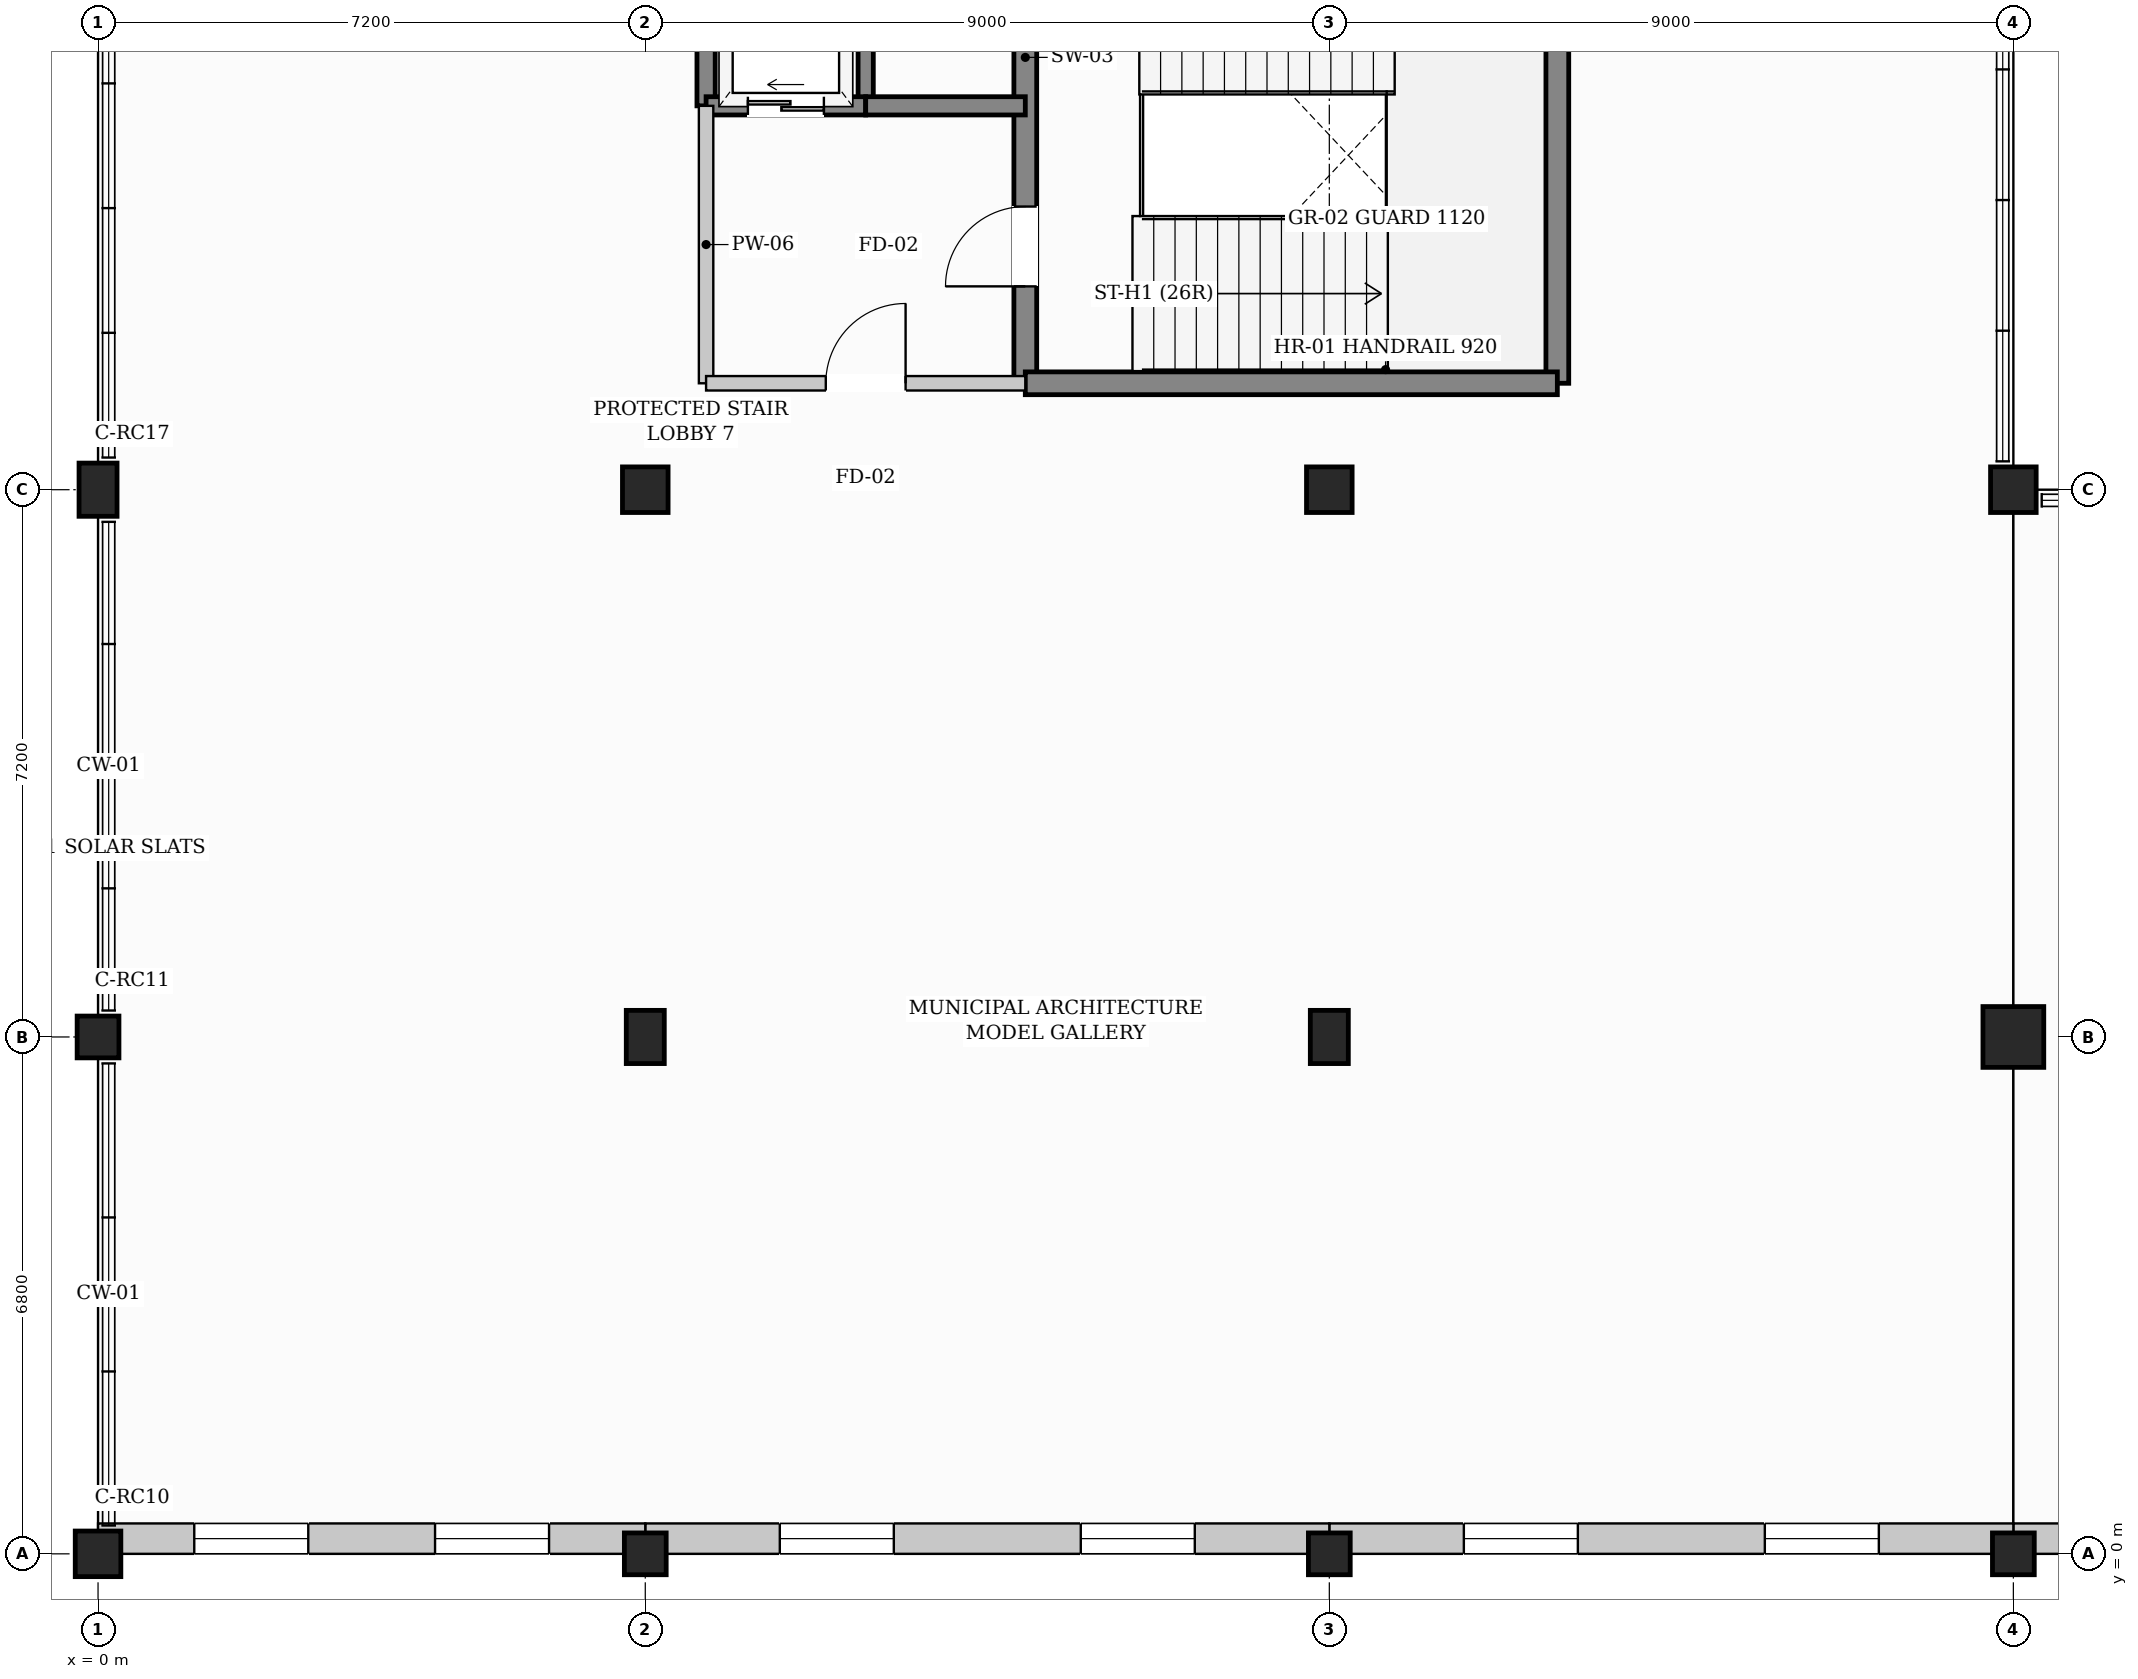
"""IFC4 building model, lengths in metres.
Left out: names, types, materials, properties, quantities, classifications, styles, units other than length and angle.
Written with IfcOpenShell. Run it as: python <this file> out.ifc"""

import sys

from ifc_helpers import new_model, si_unit, direction, frame, frame_2d, origin, origin_with_axes, origin_2d, place, context, subcontext, project, spatial, rectangle, extrude, element, fill, save


model = new_model("IFC4")
c1 = context("Model", 3, precision=1e-05, world=origin(), true_north=direction((0.0, 1.0)))
c2 = subcontext(c1, "Body", "Model", "MODEL_VIEW")
j1 = project(units=[si_unit("LENGTHUNIT", "METRE"), si_unit("PLANEANGLEUNIT", "RADIAN")], contexts=[c1])
p1 = place(None, origin())
s1 = spatial("IfcSite", under=j1, at=p1, CompositionType="ELEMENT")
p2 = place(p1, origin())
s2 = spatial("IfcBuilding", under=s1, at=p2, CompositionType="ELEMENT")
p3 = place(p2, frame((0.0, 0.0, 9.6)))
s3 = spatial("IfcBuildingStorey", under=s2, at=p3, CompositionType="ELEMENT", Elevation=9.6)
p4 = place(p3, origin_with_axes())
e1 = element("IfcColumn", 1, at=p4, inside=s3, PredefinedType="COLUMN", context=c2, shape_type="SweptSolid", body=[
    extrude(rectangle(XDim=0.6, YDim=0.6, at=origin_2d()), origin(), (0.0, 0.0, 1.0), 3.6),
])
p5 = place(p3, frame((0.0, 6.8, 0.0), z_axis=(0.0, 0.0, 1.0), x_axis=(1.0, 0.0, 0.0)))
e2 = element("IfcColumn", 2, at=p5, inside=s3, PredefinedType="COLUMN", context=c2, shape_type="SweptSolid", body=[
    extrude(rectangle(XDim=0.55, YDim=0.55, at=origin_2d()), origin(), (0.0, 0.0, 1.0), 3.6),
])
p6 = place(p3, frame((0.0, 14.0, 0.0), z_axis=(0.0, 0.0, 1.0), x_axis=(1.0, 0.0, 0.0)))
e3 = element("IfcColumn", 3, at=p6, inside=s3, PredefinedType="COLUMN", context=c2, shape_type="SweptSolid", body=[
    extrude(rectangle(XDim=0.5, YDim=0.7, at=origin_2d()), origin(), (0.0, 0.0, 1.0), 3.6),
])
p7 = place(p3, frame((7.2, 0.0, 0.0), z_axis=(0.0, 0.0, 1.0), x_axis=(1.0, 0.0, 0.0)))
e4 = element("IfcColumn", 4, at=p7, inside=s3, PredefinedType="COLUMN", context=c2, shape_type="SweptSolid", body=[
    extrude(rectangle(XDim=0.55, YDim=0.55, at=origin_2d()), origin(), (0.0, 0.0, 1.0), 3.6),
])
p8 = place(p3, frame((7.2, 6.8, 0.0), z_axis=(0.0, 0.0, 1.0), x_axis=(1.0, 0.0, 0.0)))
e5 = element("IfcColumn", 5, at=p8, inside=s3, PredefinedType="COLUMN", context=c2, shape_type="SweptSolid", body=[
    extrude(rectangle(XDim=0.5, YDim=0.7, at=origin_2d()), origin(), (0.0, 0.0, 1.0), 3.6),
])
p9 = place(p3, frame((7.2, 14.0, 0.0), z_axis=(0.0, 0.0, 1.0), x_axis=(1.0, 0.0, 0.0)))
e6 = element("IfcColumn", 6, at=p9, inside=s3, PredefinedType="COLUMN", context=c2, shape_type="SweptSolid", body=[
    extrude(rectangle(XDim=0.6, YDim=0.6, at=origin_2d()), origin(), (0.0, 0.0, 1.0), 3.6),
])
p10 = place(p3, frame((16.2, 0.0, 0.0), z_axis=(0.0, 0.0, 1.0), x_axis=(1.0, 0.0, 0.0)))
e7 = element("IfcColumn", 7, at=p10, inside=s3, PredefinedType="COLUMN", context=c2, shape_type="SweptSolid", body=[
    extrude(rectangle(XDim=0.55, YDim=0.55, at=origin_2d()), origin(), (0.0, 0.0, 1.0), 3.6),
])
p11 = place(p3, frame((16.2, 6.8, 0.0), z_axis=(0.0, 0.0, 1.0), x_axis=(1.0, 0.0, 0.0)))
e8 = element("IfcColumn", 8, at=p11, inside=s3, PredefinedType="COLUMN", context=c2, shape_type="SweptSolid", body=[
    extrude(rectangle(XDim=0.5, YDim=0.7, at=origin_2d()), origin(), (0.0, 0.0, 1.0), 3.6),
])
p12 = place(p3, frame((16.2, 14.0, 0.0), z_axis=(0.0, 0.0, 1.0), x_axis=(1.0, 0.0, 0.0)))
e9 = element("IfcColumn", 9, at=p12, inside=s3, PredefinedType="COLUMN", context=c2, shape_type="SweptSolid", body=[
    extrude(rectangle(XDim=0.6, YDim=0.6, at=origin_2d()), origin(), (0.0, 0.0, 1.0), 3.6),
])
p13 = place(p3, frame((25.2, 0.0, 0.0), z_axis=(0.0, 0.0, 1.0), x_axis=(1.0, 0.0, 0.0)))
e10 = element("IfcColumn", 10, at=p13, inside=s3, PredefinedType="COLUMN", context=c2, shape_type="SweptSolid", body=[
    extrude(rectangle(XDim=0.55, YDim=0.55, at=origin_2d()), origin(), (0.0, 0.0, 1.0), 3.6),
])
p14 = place(p3, frame((25.2, 6.8, 0.0), z_axis=(0.0, 0.0, 1.0), x_axis=(1.0, 0.0, 0.0)))
e11 = element("IfcColumn", 11, at=p14, inside=s3, PredefinedType="COLUMN", context=c2, shape_type="SweptSolid", body=[
    extrude(rectangle(XDim=0.8, YDim=0.8, at=origin_2d()), origin(), (0.0, 0.0, 1.0), 3.6),
])
p15 = place(p3, frame((25.2, 14.0, 0.0), z_axis=(0.0, 0.0, 1.0), x_axis=(1.0, 0.0, 0.0)))
e12 = element("IfcColumn", 12, at=p15, inside=s3, PredefinedType="COLUMN", context=c2, shape_type="SweptSolid", body=[
    extrude(rectangle(XDim=0.6, YDim=0.6, at=origin_2d()), origin(), (0.0, 0.0, 1.0), 3.6),
])
p16 = place(p3, frame((32.4, 0.2, 0.0), z_axis=(0.0, 0.0, 1.0), x_axis=(-1.0, 0.0, 0.0)))
e13 = element("IfcWall", 13, at=p16, inside=s3, PredefinedType="SOLIDWALL", context=c2, shape_type="SweptSolid", body=[
    extrude(rectangle(XDim=7.2, YDim=0.4, at=frame_2d((3.6, 0.0))), origin(), (0.0, 0.0, 1.0), 2.6),
])
p17 = place(p16, frame((1.266, 0.0, 0.75)))
e14 = element("IfcOpeningElement", 14, at=p17, cuts=e13, PredefinedType="OPENING", context=c2, shape_type="SweptSolid", body=[
    extrude(rectangle(XDim=1.5, YDim=1.6, at=frame_2d((0.75, 0.8))), frame((0.0, 0.21, 0.0), z_axis=(0.0, -1.0, 0.0), x_axis=(1.0, 0.0, 0.0)), (0.0, 0.0, 1.0), 0.42),
])
p18 = place(p16, frame((4.434, 0.0, 0.75)))
e15 = element("IfcOpeningElement", 15, at=p18, cuts=e13, PredefinedType="OPENING", context=c2, shape_type="SweptSolid", body=[
    extrude(rectangle(XDim=1.5, YDim=1.6, at=frame_2d((0.75, 0.8))), frame((0.0, 0.21, 0.0), z_axis=(0.0, -1.0, 0.0), x_axis=(1.0, 0.0, 0.0)), (0.0, 0.0, 1.0), 0.42),
])
p19 = place(p3, frame((25.2, 0.2, 0.0), z_axis=(0.0, 0.0, 1.0), x_axis=(-1.0, 0.0, 0.0)))
e16 = element("IfcWall", 16, at=p19, inside=s3, PredefinedType="SOLIDWALL", context=c2, shape_type="SweptSolid", body=[
    extrude(rectangle(XDim=9.0, YDim=0.4, at=frame_2d((4.5, 0.0))), origin(), (0.0, 0.0, 1.0), 2.64),
])
p20 = place(p19, frame((1.77, 0.0, 0.75)))
e17 = element("IfcOpeningElement", 17, at=p20, cuts=e16, PredefinedType="OPENING", context=c2, shape_type="SweptSolid", body=[
    extrude(rectangle(XDim=1.5, YDim=1.6, at=frame_2d((0.75, 0.8))), frame((0.0, 0.21, 0.0), z_axis=(0.0, -1.0, 0.0), x_axis=(1.0, 0.0, 0.0)), (0.0, 0.0, 1.0), 0.42),
])
p21 = place(p19, frame((5.73, 0.0, 0.75)))
e18 = element("IfcOpeningElement", 18, at=p21, cuts=e16, PredefinedType="OPENING", context=c2, shape_type="SweptSolid", body=[
    extrude(rectangle(XDim=1.5, YDim=1.6, at=frame_2d((0.75, 0.8))), frame((0.0, 0.21, 0.0), z_axis=(0.0, -1.0, 0.0), x_axis=(1.0, 0.0, 0.0)), (0.0, 0.0, 1.0), 0.42),
])
p22 = place(p3, frame((16.2, 0.2, 0.0), z_axis=(0.0, 0.0, 1.0), x_axis=(-1.0, 0.0, 0.0)))
e19 = element("IfcWall", 19, at=p22, inside=s3, PredefinedType="SOLIDWALL", context=c2, shape_type="SweptSolid", body=[
    extrude(rectangle(XDim=9.0, YDim=0.4, at=frame_2d((4.5, 0.0))), origin(), (0.0, 0.0, 1.0), 2.6),
])
p23 = place(p22, frame((1.77, 0.0, 0.75)))
e20 = element("IfcOpeningElement", 20, at=p23, cuts=e19, PredefinedType="OPENING", context=c2, shape_type="SweptSolid", body=[
    extrude(rectangle(XDim=1.5, YDim=1.6, at=frame_2d((0.75, 0.8))), frame((0.0, 0.21, 0.0), z_axis=(0.0, -1.0, 0.0), x_axis=(1.0, 0.0, 0.0)), (0.0, 0.0, 1.0), 0.42),
])
p24 = place(p22, frame((5.73, 0.0, 0.75)))
e21 = element("IfcOpeningElement", 21, at=p24, cuts=e19, PredefinedType="OPENING", context=c2, shape_type="SweptSolid", body=[
    extrude(rectangle(XDim=1.5, YDim=1.6, at=frame_2d((0.75, 0.8))), frame((0.0, 0.21, 0.0), z_axis=(0.0, -1.0, 0.0), x_axis=(1.0, 0.0, 0.0)), (0.0, 0.0, 1.0), 0.42),
])
p25 = place(p3, frame((7.2, 0.2, 0.0), z_axis=(0.0, 0.0, 1.0), x_axis=(-1.0, 0.0, 0.0)))
e22 = element("IfcWall", 22, at=p25, inside=s3, PredefinedType="SOLIDWALL", context=c2, shape_type="SweptSolid", body=[
    extrude(rectangle(XDim=7.2, YDim=0.4, at=frame_2d((3.6, 0.0))), origin(), (0.0, 0.0, 1.0), 2.6),
])
p26 = place(p25, frame((1.266, 0.0, 0.75)))
e23 = element("IfcOpeningElement", 23, at=p26, cuts=e22, PredefinedType="OPENING", context=c2, shape_type="SweptSolid", body=[
    extrude(rectangle(XDim=1.5, YDim=1.6, at=frame_2d((0.75, 0.8))), frame((0.0, 0.21, 0.0), z_axis=(0.0, -1.0, 0.0), x_axis=(1.0, 0.0, 0.0)), (0.0, 0.0, 1.0), 0.42),
])
p27 = place(p25, frame((4.434, 0.0, 0.75)))
e24 = element("IfcOpeningElement", 24, at=p27, cuts=e22, PredefinedType="OPENING", context=c2, shape_type="SweptSolid", body=[
    extrude(rectangle(XDim=1.5, YDim=1.6, at=frame_2d((0.75, 0.8))), frame((0.0, 0.21, 0.0), z_axis=(0.0, -1.0, 0.0), x_axis=(1.0, 0.0, 0.0)), (0.0, 0.0, 1.0), 0.42),
])
p28 = place(p3, frame((12.2, 15.4, 0.0), z_axis=(0.0, 0.0, 1.0), x_axis=(0.0, 1.0, 0.0)))
e25 = element("IfcWall", 25, at=p28, inside=s3, PredefinedType="SHEAR", context=c2, shape_type="SweptSolid", body=[
    extrude(rectangle(XDim=6.0, YDim=0.3, at=frame_2d((3.0, 0.0))), origin(), (0.0, 0.0, 1.0), 3.32),
])
p29 = place(p28, frame((1.275, 0.0, 0.0)))
e26 = element("IfcOpeningElement", 26, at=p29, cuts=e25, PredefinedType="OPENING", context=c2, shape_type="SweptSolid", body=[
    extrude(rectangle(XDim=1.05, YDim=2.15, at=frame_2d((0.525, 1.075))), frame((0.0, 0.16, 0.0), z_axis=(0.0, -1.0, 0.0), x_axis=(1.0, 0.0, 0.0)), (0.0, 0.0, 1.0), 0.32),
])
p30 = place(p3, frame((19.2, 15.4, 0.0), z_axis=(0.0, 0.0, 1.0), x_axis=(0.0, 1.0, 0.0)))
e27 = element("IfcWall", 27, at=p30, inside=s3, PredefinedType="SHEAR", context=c2, shape_type="SweptSolid", body=[
    extrude(rectangle(XDim=6.0, YDim=0.3, at=frame_2d((3.0, 0.0))), origin(), (0.0, 0.0, 1.0), 3.32),
])
p31 = place(p3, frame((12.2, 15.4, 0.0), z_axis=(0.0, 0.0, 1.0), x_axis=(1.0, 0.0, 0.0)))
e28 = element("IfcWall", 28, at=p31, inside=s3, PredefinedType="SHEAR", context=c2, shape_type="SweptSolid", body=[
    extrude(rectangle(XDim=7.0, YDim=0.3, at=frame_2d((3.5, 0.0))), origin(), (0.0, 0.0, 1.0), 3.32),
])
p32 = place(p3, frame((8.0, 19.05, 0.0), z_axis=(0.0, 0.0, 1.0), x_axis=(0.0, 1.0, 0.0)))
e29 = element("IfcWall", 29, at=p32, inside=s3, PredefinedType="SHEAR", context=c2, shape_type="SweptSolid", body=[
    extrude(rectangle(XDim=2.35, YDim=0.24, at=frame_2d((1.175, 0.0))), origin(), (0.0, 0.0, 1.0), 3.32),
])
p33 = place(p3, frame((10.1, 19.05, 0.0), z_axis=(0.0, 0.0, 1.0), x_axis=(0.0, 1.0, 0.0)))
e30 = element("IfcWall", 30, at=p33, inside=s3, PredefinedType="SHEAR", context=c2, shape_type="SweptSolid", body=[
    extrude(rectangle(XDim=2.35, YDim=0.2, at=frame_2d((1.175, 0.0))), origin(), (0.0, 0.0, 1.0), 3.32),
])
p34 = place(p3, frame((8.0, 19.05, 0.0), z_axis=(0.0, 0.0, 1.0), x_axis=(1.0, 0.0, 0.0)))
e31 = element("IfcWall", 31, at=p34, inside=s3, PredefinedType="SHEAR", context=c2, shape_type="SweptSolid", body=[
    extrude(rectangle(XDim=2.1, YDim=0.24, at=frame_2d((1.05, 0.0))), origin(), (0.0, 0.0, 1.0), 3.32),
])
p35 = place(p34, frame((0.55, 0.0, 0.0)))
e32 = element("IfcOpeningElement", 32, at=p35, cuts=e31, PredefinedType="OPENING", context=c2, shape_type="SweptSolid", body=[
    extrude(rectangle(XDim=1.0, YDim=2.1, at=frame_2d((0.5, 1.05))), frame((0.0, 0.13, 0.0), z_axis=(0.0, -1.0, 0.0), x_axis=(1.0, 0.0, 0.0)), (0.0, 0.0, 1.0), 0.26),
])
p36 = place(p3, frame((10.1, 19.05, 0.0), z_axis=(0.0, 0.0, 1.0), x_axis=(1.0, 0.0, 0.0)))
e33 = element("IfcWall", 33, at=p36, inside=s3, PredefinedType="SHEAR", context=c2, shape_type="SweptSolid", body=[
    extrude(rectangle(XDim=2.1, YDim=0.24, at=frame_2d((1.05, 0.0))), origin(), (0.0, 0.0, 1.0), 3.32),
])
p37 = place(p3, frame((8.0, 15.4, 0.0), z_axis=(0.0, 0.0, 1.0), x_axis=(0.0, 1.0, 0.0)))
e34 = element("IfcWall", 34, at=p37, inside=s3, PredefinedType="PARTITIONING", context=c2, shape_type="SweptSolid", body=[
    extrude(rectangle(XDim=3.65, YDim=0.19, at=frame_2d((1.825, 0.0))), origin(), (0.0, 0.0, 1.0), 3.32),
])
p38 = place(p3, frame((8.0, 15.4, 0.0), z_axis=(0.0, 0.0, 1.0), x_axis=(1.0, 0.0, 0.0)))
e35 = element("IfcWall", 35, at=p38, inside=s3, PredefinedType="PARTITIONING", context=c2, shape_type="SweptSolid", body=[
    extrude(rectangle(XDim=4.2, YDim=0.19, at=frame_2d((2.1, 0.0))), origin(), (0.0, 0.0, 1.0), 3.32),
])
p39 = place(p38, frame((1.575, 0.0, 0.0)))
e36 = element("IfcOpeningElement", 36, at=p39, cuts=e35, PredefinedType="OPENING", context=c2, shape_type="SweptSolid", body=[
    extrude(rectangle(XDim=1.05, YDim=2.15, at=frame_2d((0.525, 1.075))), frame((0.0, 0.105, 0.0), z_axis=(0.0, -1.0, 0.0), x_axis=(1.0, 0.0, 0.0)), (0.0, 0.0, 1.0), 0.21),
])
p40 = place(p20, origin())
e37 = element("IfcWindow", 37, at=p40, inside=s3, PartitioningType="DOUBLE_PANEL_HORIZONTAL", PredefinedType="WINDOW", context=c2, shape_type="SweptSolid", body=[
    extrude(rectangle(XDim=1.5, YDim=1.6, at=frame_2d((0.75, 0.8))), frame((0.0, 0.03, 0.0), z_axis=(0.0, -1.0, 0.0), x_axis=(1.0, 0.0, 0.0)), (0.0, 0.0, 1.0), 0.06),
])
fill(e17, e37)
p41 = place(p21, origin())
e38 = element("IfcWindow", 38, at=p41, inside=s3, PartitioningType="DOUBLE_PANEL_HORIZONTAL", PredefinedType="WINDOW", context=c2, shape_type="SweptSolid", body=[
    extrude(rectangle(XDim=1.5, YDim=1.6, at=frame_2d((0.75, 0.8))), frame((0.0, 0.03, 0.0), z_axis=(0.0, -1.0, 0.0), x_axis=(1.0, 0.0, 0.0)), (0.0, 0.0, 1.0), 0.06),
])
fill(e18, e38)
p42 = place(p23, origin())
e39 = element("IfcWindow", 39, at=p42, inside=s3, PartitioningType="DOUBLE_PANEL_HORIZONTAL", PredefinedType="WINDOW", context=c2, shape_type="SweptSolid", body=[
    extrude(rectangle(XDim=1.5, YDim=1.6, at=frame_2d((0.75, 0.8))), frame((0.0, 0.03, 0.0), z_axis=(0.0, -1.0, 0.0), x_axis=(1.0, 0.0, 0.0)), (0.0, 0.0, 1.0), 0.06),
])
fill(e20, e39)
p43 = place(p24, origin())
e40 = element("IfcWindow", 40, at=p43, inside=s3, PartitioningType="DOUBLE_PANEL_HORIZONTAL", PredefinedType="WINDOW", context=c2, shape_type="SweptSolid", body=[
    extrude(rectangle(XDim=1.5, YDim=1.6, at=frame_2d((0.75, 0.8))), frame((0.0, 0.03, 0.0), z_axis=(0.0, -1.0, 0.0), x_axis=(1.0, 0.0, 0.0)), (0.0, 0.0, 1.0), 0.06),
])
fill(e21, e40)
p44 = place(p26, origin())
e41 = element("IfcWindow", 41, at=p44, inside=s3, PartitioningType="DOUBLE_PANEL_HORIZONTAL", PredefinedType="WINDOW", context=c2, shape_type="SweptSolid", body=[
    extrude(rectangle(XDim=1.5, YDim=1.6, at=frame_2d((0.75, 0.8))), frame((0.0, 0.03, 0.0), z_axis=(0.0, -1.0, 0.0), x_axis=(1.0, 0.0, 0.0)), (0.0, 0.0, 1.0), 0.06),
])
fill(e23, e41)
p45 = place(p27, origin())
e42 = element("IfcWindow", 42, at=p45, inside=s3, PartitioningType="DOUBLE_PANEL_HORIZONTAL", PredefinedType="WINDOW", context=c2, shape_type="SweptSolid", body=[
    extrude(rectangle(XDim=1.5, YDim=1.6, at=frame_2d((0.75, 0.8))), frame((0.0, 0.03, 0.0), z_axis=(0.0, -1.0, 0.0), x_axis=(1.0, 0.0, 0.0)), (0.0, 0.0, 1.0), 0.06),
])
fill(e24, e42)
p46 = place(p29, origin())
e43 = element("IfcDoor", 43, at=p46, inside=s3, OperationType="SINGLE_SWING_LEFT", PredefinedType="DOOR", context=c2, shape_type="SweptSolid", body=[
    extrude(rectangle(XDim=1.05, YDim=2.15, at=frame_2d((0.525, 1.075))), frame((0.0, 0.025, 0.0), z_axis=(0.0, -1.0, 0.0), x_axis=(1.0, 0.0, 0.0)), (0.0, 0.0, 1.0), 0.05),
])
fill(e26, e43)
p47 = place(p35, origin())
e44 = element("IfcDoor", 44, at=p47, inside=s3, OperationType="SLIDING_TO_LEFT", PredefinedType="DOOR", context=c2, shape_type="SweptSolid", body=[
    extrude(rectangle(XDim=1.0, YDim=2.1, at=frame_2d((0.5, 1.05))), frame((0.0, 0.025, 0.0), z_axis=(0.0, -1.0, 0.0), x_axis=(1.0, 0.0, 0.0)), (0.0, 0.0, 1.0), 0.05),
])
fill(e32, e44)
p48 = place(p39, origin())
e45 = element("IfcDoor", 45, at=p48, inside=s3, OperationType="SINGLE_SWING_RIGHT", PredefinedType="DOOR", context=c2, shape_type="SweptSolid", body=[
    extrude(rectangle(XDim=1.05, YDim=2.15, at=frame_2d((0.525, 1.075))), frame((0.0, 0.025, 0.0), z_axis=(0.0, -1.0, 0.0), x_axis=(1.0, 0.0, 0.0)), (0.0, 0.0, 1.0), 0.05),
])
fill(e36, e45)
save(model, sys.argv[1])
